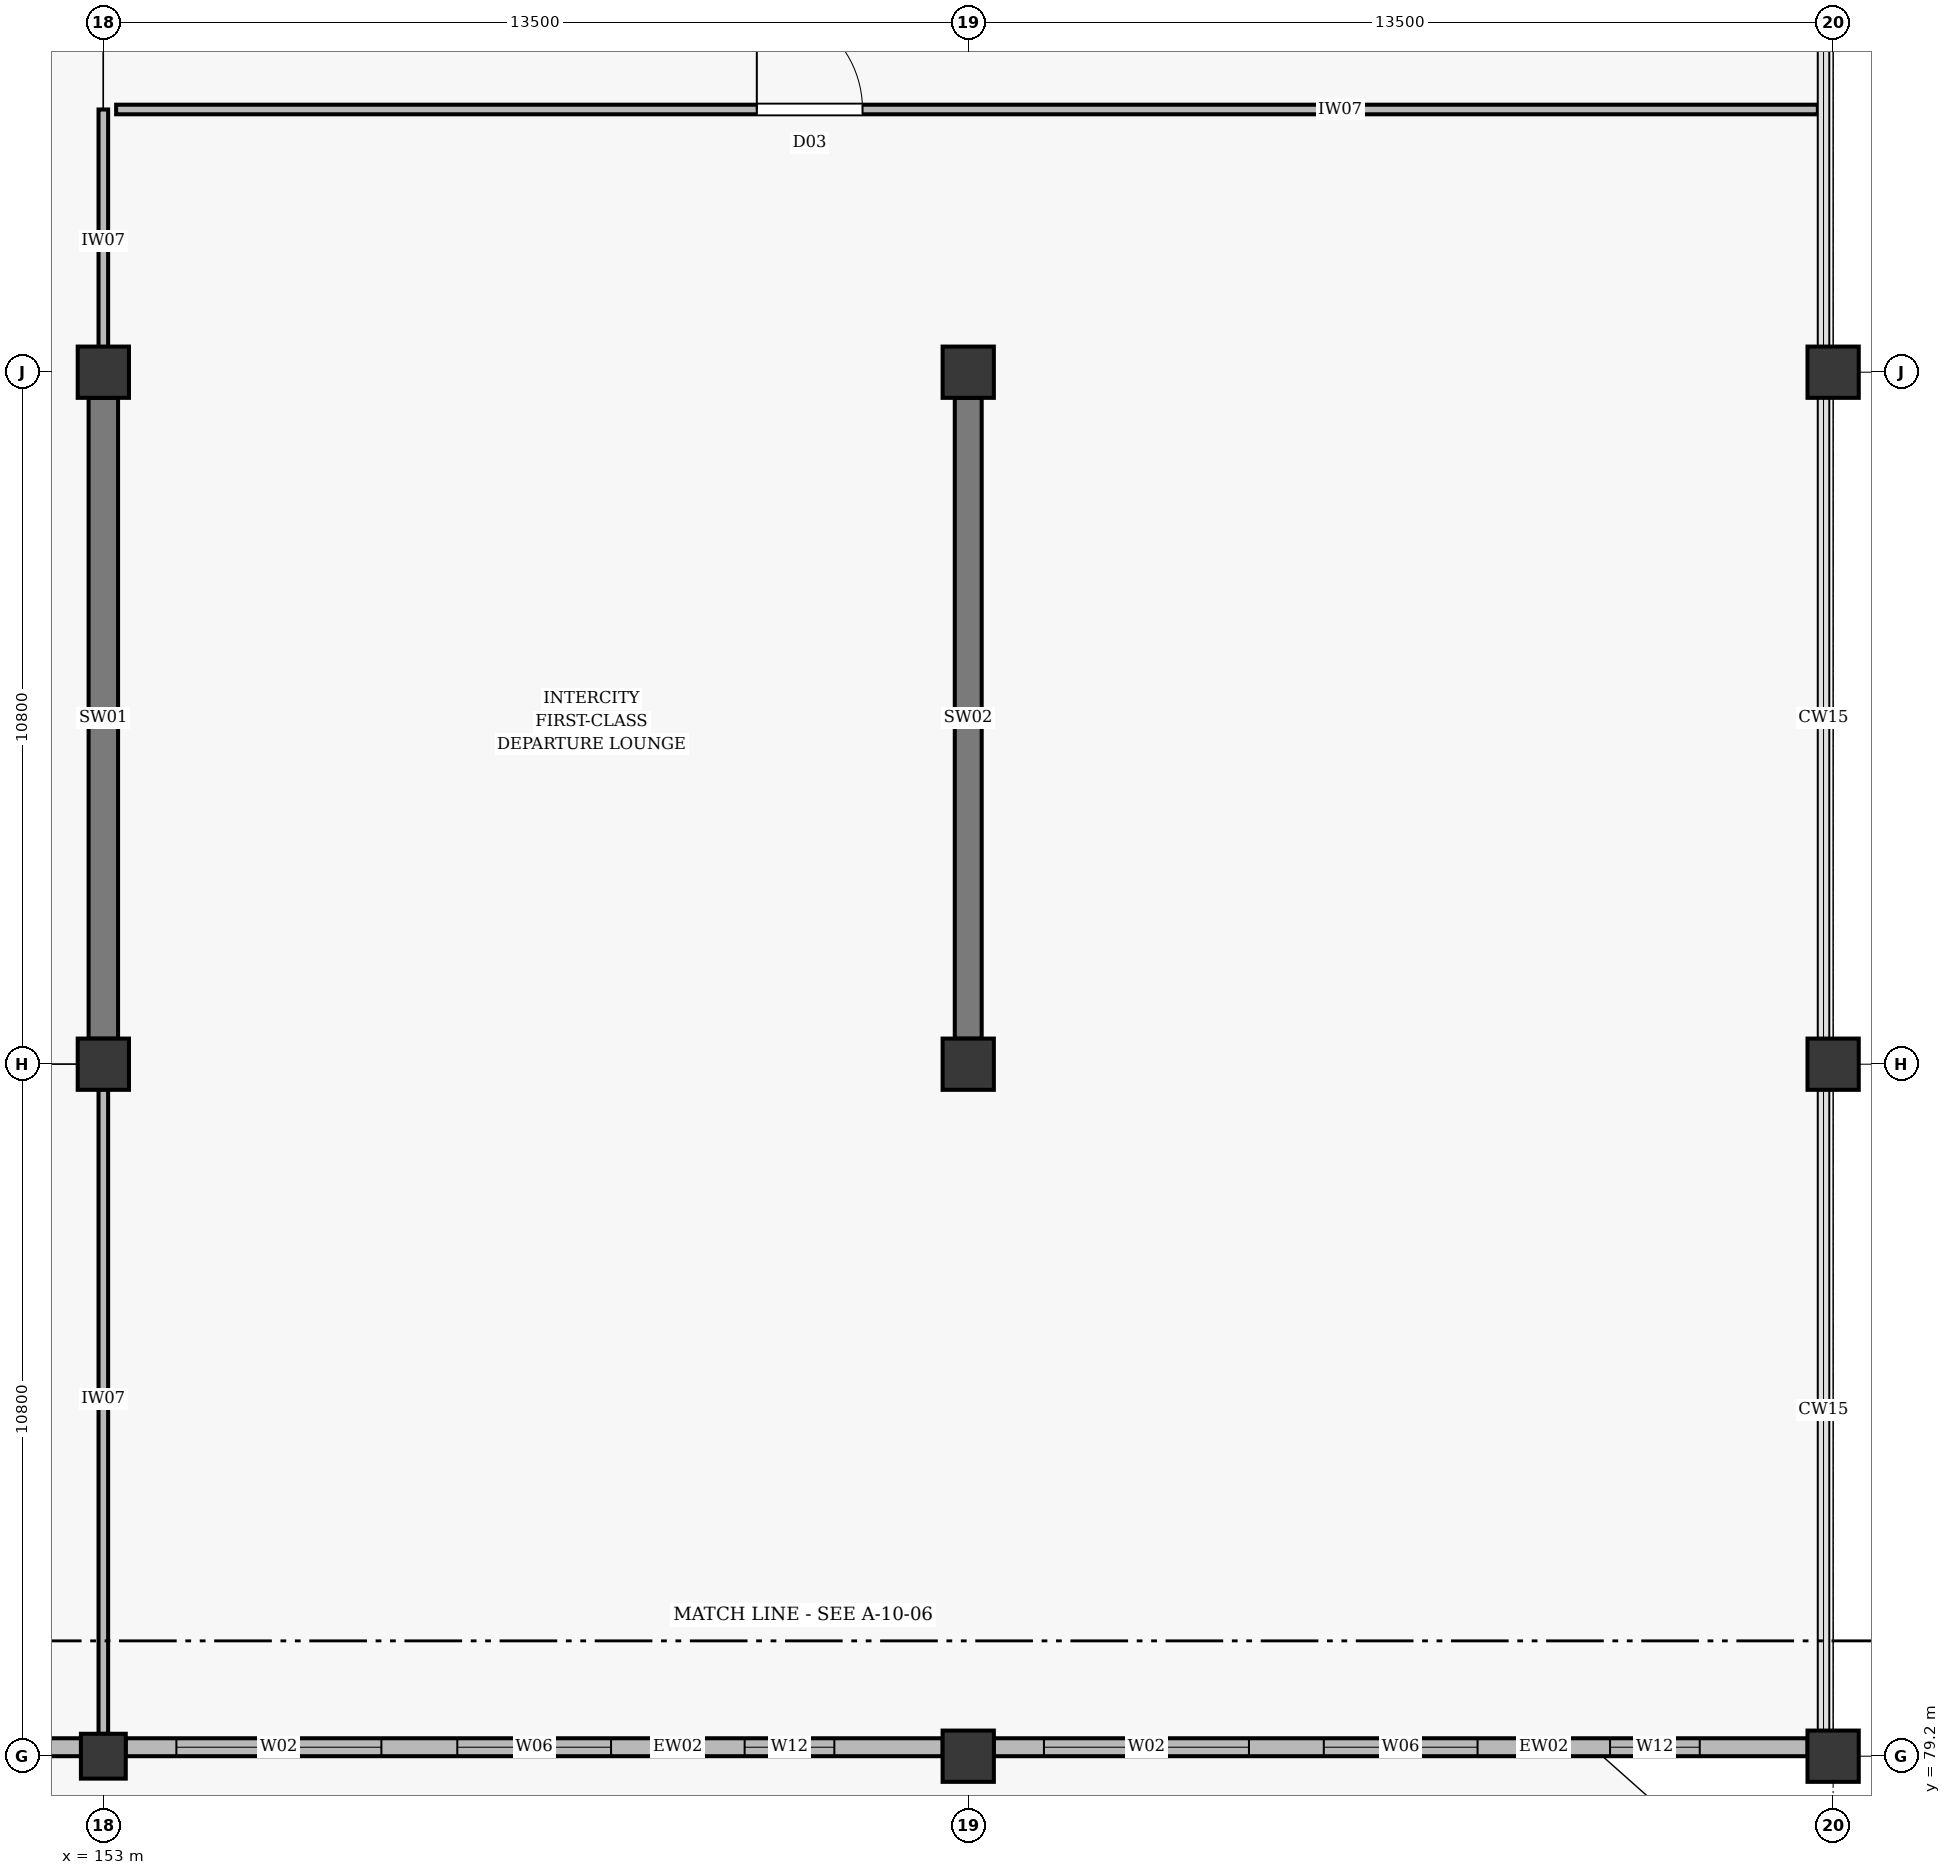
"""IFC4 building model, lengths in metres.
Left out: names, types, materials, properties, quantities, classifications, styles, units other than length and angle.
Written with IfcOpenShell. Run it as: python <this file> out.ifc"""

import sys

from ifc_helpers import new_model, si_unit, direction, frame, frame_2d, origin, origin_2d, place, context, subcontext, project, spatial, rectangle, extrude, element, fill, save


model = new_model("IFC4")
c1 = context("Model", 3, precision=1e-05, world=origin(), true_north=direction((0.0, 1.0)))
c2 = subcontext(c1, "Body", "Model", "MODEL_VIEW")
j1 = project(units=[si_unit("LENGTHUNIT", "METRE"), si_unit("PLANEANGLEUNIT", "RADIAN")], contexts=[c1])
p1 = place(None, origin())
s1 = spatial("IfcSite", under=j1, at=p1, CompositionType="ELEMENT")
p2 = place(p1, origin())
s2 = spatial("IfcBuilding", under=s1, at=p2, CompositionType="ELEMENT")
p3 = place(p2, origin())
s3 = spatial("IfcBuildingStorey", under=s2, at=p3, CompositionType="ELEMENT", Elevation=0.0)
p4 = place(p3, frame((153.0, 79.2, 0.0), z_axis=(0.0, 0.0, 1.0), x_axis=(1.0, 0.0, 0.0)))
e1 = element("IfcColumn", 1, at=p4, inside=s3, PredefinedType="COLUMN", context=c2, shape_type="SweptSolid", body=[
    extrude(rectangle(XDim=0.7, YDim=0.7, at=origin_2d()), origin(), (0.0, 0.0, 1.0), 6.6),
])
for number, where, z_axis, x_axis in (
    (2, (153.0, 90.0, 0.0), (0.0, 0.0, 1.0), (1.0, 0.0, 0.0)),
    (3, (153.0, 100.8, 0.0), (0.0, 0.0, 1.0), (1.0, 0.0, 0.0)),
    (4, (166.5, 79.2, 0.0), (0.0, 0.0, 1.0), (1.0, 0.0, 0.0)),
    (5, (166.5, 90.0, 0.0), (0.0, 0.0, 1.0), (1.0, 0.0, 0.0)),
    (6, (166.5, 100.8, 0.0), (0.0, 0.0, 1.0), (1.0, 0.0, 0.0)),
    (7, (180.0, 79.2, 0.0), (0.0, 0.0, 1.0), (1.0, 0.0, 0.0)),
    (8, (180.0, 90.0, 0.0), (0.0, 0.0, 1.0), (1.0, 0.0, 0.0)),
    (9, (180.0, 100.8, 0.0), (0.0, 0.0, 1.0), (1.0, 0.0, 0.0)),
):
    element("IfcColumn", number, at=place(p3, frame(where, z_axis=z_axis, x_axis=x_axis)), inside=s3, PredefinedType="COLUMN", context=c2, shape_type="SweptSolid", body=[
        extrude(rectangle(XDim=0.8, YDim=0.8, at=origin_2d()), origin(), (0.0, 0.0, 1.0), 6.6),
    ])
p5 = place(p3, frame((153.0, 90.398, 0.0), z_axis=(0.0, 0.0, 1.0), x_axis=(0.0, 1.0, 0.0)))
e10 = element("IfcWall", 10, at=p5, inside=s3, PredefinedType="SHEAR", context=c2, shape_type="SweptSolid", body=[
    extrude(rectangle(XDim=10.004, YDim=0.46, at=frame_2d((5.002, 0.0))), origin(), (0.0, 0.0, 1.0), 6.35),
])
p6 = place(p3, frame((166.5, 90.398, 0.0), z_axis=(0.0, 0.0, 1.0), x_axis=(0.0, 1.0, 0.0)))
e11 = element("IfcWall", 11, at=p6, inside=s3, PredefinedType="SHEAR", context=c2, shape_type="SweptSolid", body=[
    extrude(rectangle(XDim=10.004, YDim=0.42, at=frame_2d((5.002, 0.0))), origin(), (0.0, 0.0, 1.0), 6.35),
])
p7 = place(p3, frame((140.348, 79.34, 0.0), z_axis=(0.0, 0.0, 1.0), x_axis=(1.0, 0.0, 0.0)))
e12 = element("IfcWall", 12, at=p7, inside=s3, PredefinedType="STANDARD", context=c2, shape_type="SweptSolid", body=[
    extrude(rectangle(XDim=12.304, YDim=0.28, at=frame_2d((6.152, 0.0))), origin(), (0.0, 0.0, 1.0), 5.69),
])
p8 = place(p7, frame((4.2, 0.0, 0.005)))
e13 = element("IfcOpeningElement", 13, at=p8, cuts=e12, PredefinedType="OPENING", context=c2, shape_type="SweptSolid", body=[
    extrude(rectangle(XDim=2.6, YDim=2.6, at=frame_2d((1.3, 1.3))), frame((0.0, 0.152, 0.0), z_axis=(0.0, -1.0, 0.0), x_axis=(1.0, 0.0, 0.0)), (0.0, 0.0, 1.0), 0.304),
])
p9 = place(p7, frame((9.287, 0.0, 1.05)))
e14 = element("IfcOpeningElement", 14, at=p9, cuts=e12, PredefinedType="OPENING", context=c2, shape_type="SweptSolid", body=[
    extrude(rectangle(XDim=1.4, YDim=1.8, at=frame_2d((0.7, 0.9))), frame((0.0, 0.152, 0.0), z_axis=(0.0, -1.0, 0.0), x_axis=(1.0, 0.0, 0.0)), (0.0, 0.0, 1.0), 0.304),
])
p10 = place(p3, frame((153.348, 79.34, 0.0), z_axis=(0.0, 0.0, 1.0), x_axis=(1.0, 0.0, 0.0)))
e15 = element("IfcWall", 15, at=p10, inside=s3, PredefinedType="STANDARD", context=c2, shape_type="SweptSolid", body=[
    extrude(rectangle(XDim=12.754, YDim=0.28, at=frame_2d((6.377, 0.0))), origin(), (0.0, 0.0, 1.0), 5.69),
])
p11 = place(p10, frame((0.792, 0.0, 0.75)))
e16 = element("IfcOpeningElement", 16, at=p11, cuts=e15, PredefinedType="OPENING", context=c2, shape_type="SweptSolid", body=[
    extrude(rectangle(XDim=3.2, YDim=2.8, at=frame_2d((1.6, 1.4))), frame((0.0, 0.152, 0.0), z_axis=(0.0, -1.0, 0.0), x_axis=(1.0, 0.0, 0.0)), (0.0, 0.0, 1.0), 0.304),
])
p12 = place(p10, frame((5.177, 0.0, 0.75)))
e17 = element("IfcOpeningElement", 17, at=p12, cuts=e15, PredefinedType="OPENING", context=c2, shape_type="SweptSolid", body=[
    extrude(rectangle(XDim=2.4, YDim=2.4, at=frame_2d((1.2, 1.2))), frame((0.0, 0.152, 0.0), z_axis=(0.0, -1.0, 0.0), x_axis=(1.0, 0.0, 0.0)), (0.0, 0.0, 1.0), 0.304),
])
p13 = place(p10, frame((9.662, 0.0, 1.05)))
e18 = element("IfcOpeningElement", 18, at=p13, cuts=e15, PredefinedType="OPENING", context=c2, shape_type="SweptSolid", body=[
    extrude(rectangle(XDim=1.4, YDim=1.8, at=frame_2d((0.7, 0.9))), frame((0.0, 0.152, 0.0), z_axis=(0.0, -1.0, 0.0), x_axis=(1.0, 0.0, 0.0)), (0.0, 0.0, 1.0), 0.304),
])
p14 = place(p3, frame((166.898, 79.34, 0.0), z_axis=(0.0, 0.0, 1.0), x_axis=(1.0, 0.0, 0.0)))
e19 = element("IfcWall", 19, at=p14, inside=s3, PredefinedType="STANDARD", context=c2, shape_type="SweptSolid", body=[
    extrude(rectangle(XDim=12.704, YDim=0.28, at=frame_2d((6.352, 0.0))), origin(), (0.0, 0.0, 1.0), 5.69),
])
p15 = place(p14, frame((0.784, 0.0, 0.75)))
e20 = element("IfcOpeningElement", 20, at=p15, cuts=e19, PredefinedType="OPENING", context=c2, shape_type="SweptSolid", body=[
    extrude(rectangle(XDim=3.2, YDim=2.8, at=frame_2d((1.6, 1.4))), frame((0.0, 0.152, 0.0), z_axis=(0.0, -1.0, 0.0), x_axis=(1.0, 0.0, 0.0)), (0.0, 0.0, 1.0), 0.304),
])
p16 = place(p14, frame((5.152, 0.0, 0.75)))
e21 = element("IfcOpeningElement", 21, at=p16, cuts=e19, PredefinedType="OPENING", context=c2, shape_type="SweptSolid", body=[
    extrude(rectangle(XDim=2.4, YDim=2.4, at=frame_2d((1.2, 1.2))), frame((0.0, 0.152, 0.0), z_axis=(0.0, -1.0, 0.0), x_axis=(1.0, 0.0, 0.0)), (0.0, 0.0, 1.0), 0.304),
])
p17 = place(p14, frame((9.62, 0.0, 1.05)))
e22 = element("IfcOpeningElement", 22, at=p17, cuts=e19, PredefinedType="OPENING", context=c2, shape_type="SweptSolid", body=[
    extrude(rectangle(XDim=1.4, YDim=1.8, at=frame_2d((0.7, 0.9))), frame((0.0, 0.152, 0.0), z_axis=(0.0, -1.0, 0.0), x_axis=(1.0, 0.0, 0.0)), (0.0, 0.0, 1.0), 0.304),
])
p18 = place(p3, frame((153.2, 104.9, 0.0), z_axis=(0.0, 0.0, 1.0), x_axis=(1.0, 0.0, 0.0)))
e23 = element("IfcWall", 23, at=p18, inside=s3, PredefinedType="PARTITIONING", context=c2, shape_type="SweptSolid", body=[
    extrude(rectangle(XDim=26.562, YDim=0.15, at=frame_2d((13.281, 0.0))), origin(), (0.0, 0.0, 1.0), 5.89),
])
p19 = place(p18, frame((10.0, 0.0, 0.005)))
e24 = element("IfcOpeningElement", 24, at=p19, cuts=e23, PredefinedType="OPENING", context=c2, shape_type="SweptSolid", body=[
    extrude(rectangle(XDim=1.65, YDim=2.2, at=frame_2d((0.825, 1.1))), frame((0.0, 0.087, 0.0), z_axis=(0.0, -1.0, 0.0), x_axis=(1.0, 0.0, 0.0)), (0.0, 0.0, 1.0), 0.174),
])
p20 = place(p3, frame((153.0, 79.548, 0.0), z_axis=(0.0, 0.0, 1.0), x_axis=(0.0, 1.0, 0.0)))
e25 = element("IfcWall", 25, at=p20, inside=s3, PredefinedType="PARTITIONING", context=c2, shape_type="SweptSolid", body=[
    extrude(rectangle(XDim=10.452, YDim=0.15, at=frame_2d((5.226, 0.0))), origin(), (0.0, 0.0, 1.0), 5.69),
])
p21 = place(p3, frame((153.0, 100.8, 0.0), z_axis=(0.0, 0.0, 1.0), x_axis=(0.0, 1.0, 0.0)))
e26 = element("IfcWall", 26, at=p21, inside=s3, PredefinedType="PARTITIONING", context=c2, shape_type="SweptSolid", body=[
    extrude(rectangle(XDim=4.1, YDim=0.15, at=frame_2d((2.05, 0.0))), origin(), (0.0, 0.0, 1.0), 5.74),
])
p22 = place(p11, origin())
e27 = element("IfcWindow", 27, at=p22, inside=s3, PartitioningType="DOUBLE_PANEL_VERTICAL", PredefinedType="WINDOW", context=c2, shape_type="SweptSolid", body=[
    extrude(rectangle(XDim=3.2, YDim=2.8, at=frame_2d((1.6, 1.4))), frame((0.0, 0.03, 0.0), z_axis=(0.0, -1.0, 0.0), x_axis=(1.0, 0.0, 0.0)), (0.0, 0.0, 1.0), 0.06),
])
fill(e16, e27)
p23 = place(p12, origin())
e28 = element("IfcWindow", 28, at=p23, inside=s3, PartitioningType="DOUBLE_PANEL_VERTICAL", PredefinedType="WINDOW", context=c2, shape_type="SweptSolid", body=[
    extrude(rectangle(XDim=2.4, YDim=2.4, at=frame_2d((1.2, 1.2))), frame((0.0, 0.03, 0.0), z_axis=(0.0, -1.0, 0.0), x_axis=(1.0, 0.0, 0.0)), (0.0, 0.0, 1.0), 0.06),
])
fill(e17, e28)
p24 = place(p13, origin())
e29 = element("IfcWindow", 29, at=p24, inside=s3, PartitioningType="DOUBLE_PANEL_VERTICAL", PredefinedType="WINDOW", context=c2, shape_type="SweptSolid", body=[
    extrude(rectangle(XDim=1.4, YDim=1.8, at=frame_2d((0.7, 0.9))), frame((0.0, 0.03, 0.0), z_axis=(0.0, -1.0, 0.0), x_axis=(1.0, 0.0, 0.0)), (0.0, 0.0, 1.0), 0.06),
])
fill(e18, e29)
p25 = place(p15, origin())
e30 = element("IfcWindow", 30, at=p25, inside=s3, PartitioningType="DOUBLE_PANEL_VERTICAL", PredefinedType="WINDOW", context=c2, shape_type="SweptSolid", body=[
    extrude(rectangle(XDim=3.2, YDim=2.8, at=frame_2d((1.6, 1.4))), frame((0.0, 0.03, 0.0), z_axis=(0.0, -1.0, 0.0), x_axis=(1.0, 0.0, 0.0)), (0.0, 0.0, 1.0), 0.06),
])
fill(e20, e30)
p26 = place(p16, origin())
e31 = element("IfcWindow", 31, at=p26, inside=s3, PartitioningType="DOUBLE_PANEL_VERTICAL", PredefinedType="WINDOW", context=c2, shape_type="SweptSolid", body=[
    extrude(rectangle(XDim=2.4, YDim=2.4, at=frame_2d((1.2, 1.2))), frame((0.0, 0.03, 0.0), z_axis=(0.0, -1.0, 0.0), x_axis=(1.0, 0.0, 0.0)), (0.0, 0.0, 1.0), 0.06),
])
fill(e21, e31)
p27 = place(p17, origin())
e32 = element("IfcWindow", 32, at=p27, inside=s3, PartitioningType="DOUBLE_PANEL_VERTICAL", PredefinedType="WINDOW", context=c2, shape_type="SweptSolid", body=[
    extrude(rectangle(XDim=1.4, YDim=1.8, at=frame_2d((0.7, 0.9))), frame((0.0, 0.03, 0.0), z_axis=(0.0, -1.0, 0.0), x_axis=(1.0, 0.0, 0.0)), (0.0, 0.0, 1.0), 0.06),
])
fill(e22, e32)
p28 = place(p19, origin())
e33 = element("IfcDoor", 33, at=p28, inside=s3, OperationType="DOUBLE_DOOR_SINGLE_SWING", PredefinedType="DOOR", context=c2, shape_type="SweptSolid", body=[
    extrude(rectangle(XDim=1.65, YDim=2.2, at=frame_2d((0.825, 1.1))), frame((0.0, 0.025, 0.0), z_axis=(0.0, -1.0, 0.0), x_axis=(1.0, 0.0, 0.0)), (0.0, 0.0, 1.0), 0.05),
])
fill(e24, e33)
save(model, sys.argv[1])
